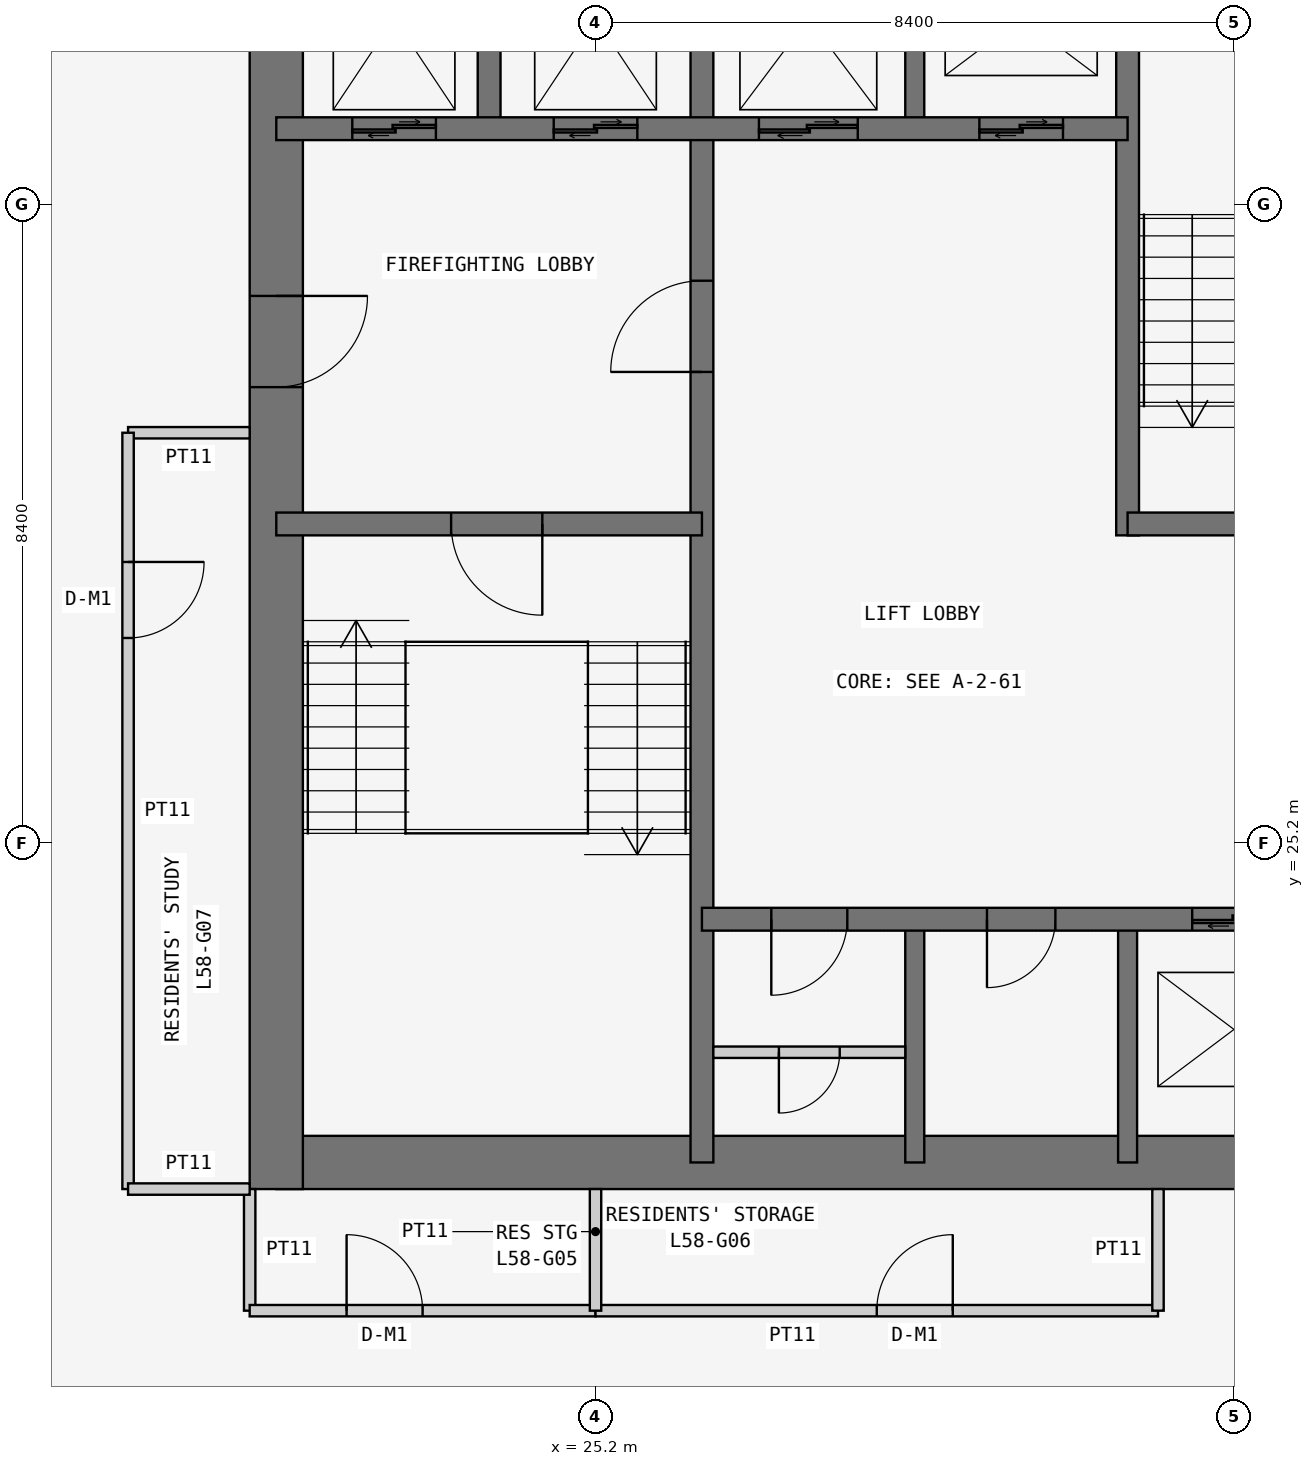
"""IFC4 building model, lengths in metres.
Left out: names, types, materials, properties, quantities, classifications, styles, units other than length and angle.
Written with IfcOpenShell. Run it as: python <this file> out.ifc"""

import sys

from ifc_helpers import new_model, si_unit, direction, frame, frame_2d, origin, place, context, subcontext, project, spatial, rectangle, extrude, element, fill, save


model = new_model("IFC4")
c1 = context("Model", 3, precision=1e-05, world=origin(), true_north=direction((0.0, 1.0)))
c2 = subcontext(c1, "Body", "Model", "MODEL_VIEW")
j1 = project(units=[si_unit("LENGTHUNIT", "METRE"), si_unit("PLANEANGLEUNIT", "RADIAN")], contexts=[c1])
p1 = place(None, origin())
s1 = spatial("IfcSite", under=j1, at=p1, CompositionType="ELEMENT")
p2 = place(p1, origin())
s2 = spatial("IfcBuilding", under=s1, at=p2, CompositionType="ELEMENT")
p3 = place(p2, frame((0.0, 0.0, 222.9)))
s3 = spatial("IfcBuildingStorey", under=s2, at=p3, CompositionType="ELEMENT", Elevation=222.9)
p4 = place(p3, frame((21.0, 21.0, 0.0), z_axis=(0.0, 0.0, 1.0), x_axis=(1.0, 0.0, 0.0)))
e1 = element("IfcWall", 1, at=p4, inside=s3, PredefinedType="SHEAR", context=c2, shape_type="SweptSolid", body=[
    extrude(rectangle(XDim=17.15, YDim=0.7, at=frame_2d((8.575, 0.0))), origin(), (0.0, 0.0, 1.0), 3.6),
])
p5 = place(p3, frame((21.0, 37.8, 0.0), z_axis=(0.0, 0.0, 1.0), x_axis=(0.0, -1.0, 0.0)))
e2 = element("IfcWall", 2, at=p5, inside=s3, PredefinedType="SHEAR", context=c2, shape_type="SweptSolid", body=[
    extrude(rectangle(XDim=17.15, YDim=0.7, at=frame_2d((8.575, 0.0))), origin(), (0.0, 0.0, 1.0), 3.6),
])
p6 = place(p5, frame((5.4, 0.0, 0.0)))
e3 = element("IfcOpeningElement", 3, at=p6, cuts=e2, PredefinedType="OPENING", context=c2, shape_type="SweptSolid", body=[
    extrude(rectangle(XDim=1.2, YDim=2.1, at=frame_2d((0.6, 1.05))), frame((0.0, 0.36, 0.0), z_axis=(0.0, -1.0, 0.0), x_axis=(1.0, 0.0, 0.0)), (0.0, 0.0, 1.0), 0.72),
])
p7 = place(p3, frame((26.6, 21.0, 0.0), z_axis=(0.0, 0.0, 1.0), x_axis=(0.0, 1.0, 0.0)))
e4 = element("IfcWall", 4, at=p7, inside=s3, PredefinedType="SHEAR", context=c2, shape_type="SweptSolid", body=[
    extrude(rectangle(XDim=16.8, YDim=0.3, at=frame_2d((8.4, 0.0))), origin(), (0.0, 0.0, 1.0), 3.6),
])
p8 = place(p7, frame((10.4, 0.0, 0.0)))
e5 = element("IfcOpeningElement", 5, at=p8, cuts=e4, PredefinedType="OPENING", context=c2, shape_type="SweptSolid", body=[
    extrude(rectangle(XDim=1.2, YDim=2.1, at=frame_2d((0.6, 1.05))), frame((0.0, 0.16, 0.0), z_axis=(0.0, -1.0, 0.0), x_axis=(1.0, 0.0, 0.0)), (0.0, 0.0, 1.0), 0.32),
])
p9 = place(p3, frame((21.0, 29.4, 0.0), z_axis=(0.0, 0.0, 1.0), x_axis=(1.0, 0.0, 0.0)))
e6 = element("IfcWall", 6, at=p9, inside=s3, PredefinedType="SHEAR", context=c2, shape_type="SweptSolid", body=[
    extrude(rectangle(XDim=5.6, YDim=0.3, at=frame_2d((2.8, 0.0))), origin(), (0.0, 0.0, 1.0), 3.6),
])
p10 = place(p9, frame((2.3, 0.0, 0.0)))
e7 = element("IfcOpeningElement", 7, at=p10, cuts=e6, PredefinedType="OPENING", context=c2, shape_type="SweptSolid", body=[
    extrude(rectangle(XDim=1.2, YDim=2.1, at=frame_2d((0.6, 1.05))), frame((0.0, 0.16, 0.0), z_axis=(0.0, -1.0, 0.0), x_axis=(1.0, 0.0, 0.0)), (0.0, 0.0, 1.0), 0.32),
])
p11 = place(p3, frame((21.0, 34.6, 0.0), z_axis=(0.0, 0.0, 1.0), x_axis=(1.0, 0.0, 0.0)))
e8 = element("IfcWall", 8, at=p11, inside=s3, PredefinedType="SHEAR", context=c2, shape_type="SweptSolid", body=[
    extrude(rectangle(XDim=11.2, YDim=0.3, at=frame_2d((5.6, 0.0))), origin(), (0.0, 0.0, 1.0), 3.6),
])
p12 = place(p11, frame((9.25, 0.0, 0.0)))
e9 = element("IfcOpeningElement", 9, at=p12, cuts=e8, PredefinedType="OPENING", context=c2, shape_type="SweptSolid", body=[
    extrude(rectangle(XDim=1.1, YDim=2.1, at=frame_2d((0.55, 1.05))), frame((0.0, 0.16, 0.0), z_axis=(0.0, -1.0, 0.0), x_axis=(1.0, 0.0, 0.0)), (0.0, 0.0, 1.0), 0.32),
])
p13 = place(p11, frame((1.0, 0.0, 0.0)))
e10 = element("IfcOpeningElement", 10, at=p13, cuts=e8, PredefinedType="OPENING", context=c2, shape_type="SweptSolid", body=[
    extrude(rectangle(XDim=1.1, YDim=2.1, at=frame_2d((0.55, 1.05))), frame((0.0, 0.16, 0.0), z_axis=(0.0, -1.0, 0.0), x_axis=(1.0, 0.0, 0.0)), (0.0, 0.0, 1.0), 0.32),
])
p14 = place(p11, frame((3.65, 0.0, 0.0)))
e11 = element("IfcOpeningElement", 11, at=p14, cuts=e8, PredefinedType="OPENING", context=c2, shape_type="SweptSolid", body=[
    extrude(rectangle(XDim=1.1, YDim=2.1, at=frame_2d((0.55, 1.05))), frame((0.0, 0.16, 0.0), z_axis=(0.0, -1.0, 0.0), x_axis=(1.0, 0.0, 0.0)), (0.0, 0.0, 1.0), 0.32),
])
p15 = place(p11, frame((6.35, 0.0, 0.0)))
e12 = element("IfcOpeningElement", 12, at=p15, cuts=e8, PredefinedType="OPENING", context=c2, shape_type="SweptSolid", body=[
    extrude(rectangle(XDim=1.3, YDim=2.1, at=frame_2d((0.65, 1.05))), frame((0.0, 0.16, 0.0), z_axis=(0.0, -1.0, 0.0), x_axis=(1.0, 0.0, 0.0)), (0.0, 0.0, 1.0), 0.32),
])
p16 = place(p3, frame((23.8, 34.6, 0.0), z_axis=(0.0, 0.0, 1.0), x_axis=(0.0, 1.0, 0.0)))
e13 = element("IfcWall", 13, at=p16, inside=s3, PredefinedType="SHEAR", context=c2, shape_type="SweptSolid", body=[
    extrude(rectangle(XDim=3.2, YDim=0.3, at=frame_2d((1.6, 0.0))), origin(), (0.0, 0.0, 1.0), 3.6),
])
p17 = place(p3, frame((26.6, 24.2, 0.0), z_axis=(0.0, 0.0, 1.0), x_axis=(1.0, 0.0, 0.0)))
e14 = element("IfcWall", 14, at=p17, inside=s3, PredefinedType="SHEAR", context=c2, shape_type="SweptSolid", body=[
    extrude(rectangle(XDim=11.2, YDim=0.3, at=frame_2d((5.6, 0.0))), origin(), (0.0, 0.0, 1.0), 3.6),
])
p18 = place(p17, frame((0.913, 0.0, 0.0)))
e15 = element("IfcOpeningElement", 15, at=p18, cuts=e14, PredefinedType="OPENING", context=c2, shape_type="SweptSolid", body=[
    extrude(rectangle(XDim=1.0, YDim=2.1, at=frame_2d((0.5, 1.05))), frame((0.0, 0.16, 0.0), z_axis=(0.0, -1.0, 0.0), x_axis=(1.0, 0.0, 0.0)), (0.0, 0.0, 1.0), 0.32),
])
p19 = place(p17, frame((3.75, 0.0, 0.0)))
e16 = element("IfcOpeningElement", 16, at=p19, cuts=e14, PredefinedType="OPENING", context=c2, shape_type="SweptSolid", body=[
    extrude(rectangle(XDim=0.9, YDim=2.1, at=frame_2d((0.45, 1.05))), frame((0.0, 0.16, 0.0), z_axis=(0.0, -1.0, 0.0), x_axis=(1.0, 0.0, 0.0)), (0.0, 0.0, 1.0), 0.32),
])
p20 = place(p17, frame((6.45, 0.0, 0.0)))
e17 = element("IfcOpeningElement", 17, at=p20, cuts=e14, PredefinedType="OPENING", context=c2, shape_type="SweptSolid", body=[
    extrude(rectangle(XDim=1.1, YDim=2.1, at=frame_2d((0.55, 1.05))), frame((0.0, 0.16, 0.0), z_axis=(0.0, -1.0, 0.0), x_axis=(1.0, 0.0, 0.0)), (0.0, 0.0, 1.0), 0.32),
])
p21 = place(p17, frame((9.1, 0.0, 0.0)))
e18 = element("IfcOpeningElement", 18, at=p21, cuts=e14, PredefinedType="OPENING", context=c2, shape_type="SweptSolid", body=[
    extrude(rectangle(XDim=1.1, YDim=2.1, at=frame_2d((0.55, 1.05))), frame((0.0, 0.16, 0.0), z_axis=(0.0, -1.0, 0.0), x_axis=(1.0, 0.0, 0.0)), (0.0, 0.0, 1.0), 0.32),
])
p22 = place(p3, frame((32.2, 29.25, 0.0), z_axis=(0.0, 0.0, 1.0), x_axis=(0.0, 1.0, 0.0)))
e19 = element("IfcWall", 19, at=p22, inside=s3, PredefinedType="SHEAR", context=c2, shape_type="SweptSolid", body=[
    extrude(rectangle(XDim=8.55, YDim=0.3, at=frame_2d((4.275, 0.0))), origin(), (0.0, 0.0, 1.0), 3.6),
])
p23 = place(p3, frame((32.2, 29.4, 0.0), z_axis=(0.0, 0.0, 1.0), x_axis=(1.0, 0.0, 0.0)))
e20 = element("IfcWall", 20, at=p23, inside=s3, PredefinedType="SHEAR", context=c2, shape_type="SweptSolid", body=[
    extrude(rectangle(XDim=5.6, YDim=0.3, at=frame_2d((2.8, 0.0))), origin(), (0.0, 0.0, 1.0), 3.6),
])
p24 = place(p23, frame((2.0, 0.0, 0.0)))
e21 = element("IfcOpeningElement", 21, at=p24, cuts=e20, PredefinedType="OPENING", context=c2, shape_type="SweptSolid", body=[
    extrude(rectangle(XDim=1.2, YDim=2.1, at=frame_2d((0.6, 1.05))), frame((0.0, 0.16, 0.0), z_axis=(0.0, -1.0, 0.0), x_axis=(1.0, 0.0, 0.0)), (0.0, 0.0, 1.0), 0.32),
])
for number, where, z_axis, x_axis in (
    (22, (29.4, 21.0, 0.0), (0.0, 0.0, 1.0), (0.0, 1.0, 0.0)),
    (23, (32.2, 21.0, 0.0), (0.0, 0.0, 1.0), (0.0, 1.0, 0.0)),
    (24, (29.4, 34.6, 0.0), (0.0, 0.0, 1.0), (0.0, 1.0, 0.0)),
):
    element("IfcWall", number, at=place(p3, frame(where, z_axis=z_axis, x_axis=x_axis)), inside=s3, PredefinedType="SHEAR", context=c2, shape_type="SweptSolid", body=[
        extrude(rectangle(XDim=3.2, YDim=0.25, at=frame_2d((1.6, 0.0))), origin(), (0.0, 0.0, 1.0), 3.6),
    ])
p25 = place(p3, frame((20.65, 20.65, 0.0), z_axis=(0.0, 0.0, 1.0), x_axis=(0.0, -1.0, 0.0)))
e25 = element("IfcWall", 25, at=p25, inside=s3, PredefinedType="PARTITIONING", context=c2, shape_type="SweptSolid", body=[
    extrude(rectangle(XDim=1.6, YDim=0.15, at=frame_2d((0.8, 0.0))), origin(), (0.0, 0.0, 1.0), 3.45),
])
p26 = place(p3, frame((20.65, 19.05, 0.0), z_axis=(0.0, 0.0, 1.0), x_axis=(1.0, 0.0, 0.0)))
e26 = element("IfcWall", 26, at=p26, inside=s3, PredefinedType="PARTITIONING", context=c2, shape_type="SweptSolid", body=[
    extrude(rectangle(XDim=4.55, YDim=0.15, at=frame_2d((2.275, 0.0))), origin(), (0.0, 0.0, 1.0), 3.45),
])
p27 = place(p26, frame((1.275, 0.0, 0.0)))
e27 = element("IfcOpeningElement", 27, at=p27, cuts=e26, PredefinedType="OPENING", context=c2, shape_type="SweptSolid", body=[
    extrude(rectangle(XDim=1.0, YDim=2.1, at=frame_2d((0.5, 1.05))), frame((0.0, 0.085, 0.0), z_axis=(0.0, -1.0, 0.0), x_axis=(1.0, 0.0, 0.0)), (0.0, 0.0, 1.0), 0.17),
])
p28 = place(p3, frame((25.2, 19.05, 0.0), z_axis=(0.0, 0.0, 1.0), x_axis=(1.0, 0.0, 0.0)))
e28 = element("IfcWall", 28, at=p28, inside=s3, PredefinedType="PARTITIONING", context=c2, shape_type="SweptSolid", body=[
    extrude(rectangle(XDim=7.4, YDim=0.15, at=frame_2d((3.7, 0.0))), origin(), (0.0, 0.0, 1.0), 3.45),
])
p29 = place(p28, frame((3.7, 0.0, 0.0)))
e29 = element("IfcOpeningElement", 29, at=p29, cuts=e28, PredefinedType="OPENING", context=c2, shape_type="SweptSolid", body=[
    extrude(rectangle(XDim=1.0, YDim=2.1, at=frame_2d((0.5, 1.05))), frame((0.0, 0.085, 0.0), z_axis=(0.0, -1.0, 0.0), x_axis=(1.0, 0.0, 0.0)), (0.0, 0.0, 1.0), 0.17),
])
for number, where, z_axis, x_axis in (
    (30, (32.6, 19.05, 0.0), (0.0, 0.0, 1.0), (0.0, 1.0, 0.0)),
    (31, (20.65, 30.6, 0.0), (0.0, 0.0, 1.0), (-1.0, 0.0, 0.0)),
):
    element("IfcWall", number, at=place(p3, frame(where, z_axis=z_axis, x_axis=x_axis)), inside=s3, PredefinedType="PARTITIONING", context=c2, shape_type="SweptSolid", body=[
        extrude(rectangle(XDim=1.6, YDim=0.15, at=frame_2d((0.8, 0.0))), origin(), (0.0, 0.0, 1.0), 3.45),
    ])
p30 = place(p3, frame((19.05, 30.6, 0.0), z_axis=(0.0, 0.0, 1.0), x_axis=(0.0, -1.0, 0.0)))
e32 = element("IfcWall", 32, at=p30, inside=s3, PredefinedType="PARTITIONING", context=c2, shape_type="SweptSolid", body=[
    extrude(rectangle(XDim=9.95, YDim=0.15, at=frame_2d((4.975, 0.0))), origin(), (0.0, 0.0, 1.0), 3.45),
])
p31 = place(p30, frame((1.7, 0.0, 0.0)))
e33 = element("IfcOpeningElement", 33, at=p31, cuts=e32, PredefinedType="OPENING", context=c2, shape_type="SweptSolid", body=[
    extrude(rectangle(XDim=1.0, YDim=2.1, at=frame_2d((0.5, 1.05))), frame((0.0, 0.085, 0.0), z_axis=(0.0, -1.0, 0.0), x_axis=(1.0, 0.0, 0.0)), (0.0, 0.0, 1.0), 0.17),
])
p32 = place(p3, frame((19.05, 20.65, 0.0), z_axis=(0.0, 0.0, 1.0), x_axis=(1.0, 0.0, 0.0)))
e34 = element("IfcWall", 34, at=p32, inside=s3, PredefinedType="PARTITIONING", context=c2, shape_type="SweptSolid", body=[
    extrude(rectangle(XDim=1.6, YDim=0.15, at=frame_2d((0.8, 0.0))), origin(), (0.0, 0.0, 1.0), 3.45),
])
p33 = place(p3, frame((25.2, 19.05, 0.0), z_axis=(0.0, 0.0, 1.0), x_axis=(0.0, 1.0, 0.0)))
e35 = element("IfcWall", 35, at=p33, inside=s3, PredefinedType="PARTITIONING", context=c2, shape_type="SweptSolid", body=[
    extrude(rectangle(XDim=1.6, YDim=0.15, at=frame_2d((0.8, 0.0))), origin(), (0.0, 0.0, 1.0), 2.767),
])
p34 = place(p3, frame((26.75, 22.45, 0.0), z_axis=(0.0, 0.0, 1.0), x_axis=(1.0, 0.0, 0.0)))
e36 = element("IfcWall", 36, at=p34, inside=s3, PredefinedType="PARTITIONING", context=c2, shape_type="SweptSolid", body=[
    extrude(rectangle(XDim=2.525, YDim=0.15, at=frame_2d((1.262, 0.0))), origin(), (0.0, 0.0, 1.0), 3.45),
])
p35 = place(p34, frame((0.863, 0.0, 0.0)))
e37 = element("IfcOpeningElement", 37, at=p35, cuts=e36, PredefinedType="OPENING", context=c2, shape_type="SweptSolid", body=[
    extrude(rectangle(XDim=0.8, YDim=2.1, at=frame_2d((0.4, 1.05))), frame((0.0, 0.085, 0.0), z_axis=(0.0, -1.0, 0.0), x_axis=(1.0, 0.0, 0.0)), (0.0, 0.0, 1.0), 0.17),
])
p36 = place(p27, origin())
e38 = element("IfcDoor", 38, at=p36, inside=s3, OperationType="SINGLE_SWING_LEFT", PredefinedType="DOOR", context=c2, shape_type="SweptSolid", body=[
    extrude(rectangle(XDim=1.0, YDim=2.1, at=frame_2d((0.5, 1.05))), frame((0.0, 0.025, 0.0), z_axis=(0.0, -1.0, 0.0), x_axis=(1.0, 0.0, 0.0)), (0.0, 0.0, 1.0), 0.05),
])
fill(e27, e38)
p37 = place(p29, origin())
e39 = element("IfcDoor", 39, at=p37, inside=s3, OperationType="SINGLE_SWING_RIGHT", PredefinedType="DOOR", context=c2, shape_type="SweptSolid", body=[
    extrude(rectangle(XDim=1.0, YDim=2.1, at=frame_2d((0.5, 1.05))), frame((0.0, 0.025, 0.0), z_axis=(0.0, -1.0, 0.0), x_axis=(1.0, 0.0, 0.0)), (0.0, 0.0, 1.0), 0.05),
])
fill(e29, e39)
p38 = place(p31, origin())
e40 = element("IfcDoor", 40, at=p38, inside=s3, OperationType="SINGLE_SWING_LEFT", PredefinedType="DOOR", context=c2, shape_type="SweptSolid", body=[
    extrude(rectangle(XDim=1.0, YDim=2.1, at=frame_2d((0.5, 1.05))), frame((0.0, 0.025, 0.0), z_axis=(0.0, -1.0, 0.0), x_axis=(1.0, 0.0, 0.0)), (0.0, 0.0, 1.0), 0.05),
])
fill(e33, e40)
p39 = place(p6, origin())
e41 = element("IfcDoor", 41, at=p39, inside=s3, OperationType="SINGLE_SWING_LEFT", PredefinedType="DOOR", context=c2, shape_type="SweptSolid", body=[
    extrude(rectangle(XDim=1.2, YDim=2.1, at=frame_2d((0.6, 1.05))), frame((0.0, 0.025, 0.0), z_axis=(0.0, -1.0, 0.0), x_axis=(1.0, 0.0, 0.0)), (0.0, 0.0, 1.0), 0.05),
])
fill(e3, e41)
p40 = place(p10, frame((1.2, 0.0, 0.0), z_axis=(0.0, 0.0, 1.0), x_axis=(-1.0, 0.0, 0.0)))
e42 = element("IfcDoor", 42, at=p40, inside=s3, OperationType="SINGLE_SWING_LEFT", PredefinedType="DOOR", context=c2, shape_type="SweptSolid", body=[
    extrude(rectangle(XDim=1.2, YDim=2.1, at=frame_2d((0.6, 1.05))), frame((0.0, 0.025, 0.0), z_axis=(0.0, -1.0, 0.0), x_axis=(1.0, 0.0, 0.0)), (0.0, 0.0, 1.0), 0.05),
])
fill(e7, e42)
p41 = place(p8, origin())
e43 = element("IfcDoor", 43, at=p41, inside=s3, OperationType="SINGLE_SWING_LEFT", PredefinedType="DOOR", context=c2, shape_type="SweptSolid", body=[
    extrude(rectangle(XDim=1.2, YDim=2.1, at=frame_2d((0.6, 1.05))), frame((0.0, 0.025, 0.0), z_axis=(0.0, -1.0, 0.0), x_axis=(1.0, 0.0, 0.0)), (0.0, 0.0, 1.0), 0.05),
])
fill(e5, e43)
p42 = place(p18, frame((1.0, 0.0, 0.0), z_axis=(0.0, 0.0, 1.0), x_axis=(-1.0, 0.0, 0.0)))
e44 = element("IfcDoor", 44, at=p42, inside=s3, OperationType="SINGLE_SWING_RIGHT", PredefinedType="DOOR", context=c2, shape_type="SweptSolid", body=[
    extrude(rectangle(XDim=1.0, YDim=2.1, at=frame_2d((0.5, 1.05))), frame((0.0, 0.025, 0.0), z_axis=(0.0, -1.0, 0.0), x_axis=(1.0, 0.0, 0.0)), (0.0, 0.0, 1.0), 0.05),
])
fill(e15, e44)
p43 = place(p35, frame((0.8, 0.0, 0.0), z_axis=(0.0, 0.0, 1.0), x_axis=(-1.0, 0.0, 0.0)))
e45 = element("IfcDoor", 45, at=p43, inside=s3, OperationType="SINGLE_SWING_RIGHT", PredefinedType="DOOR", context=c2, shape_type="SweptSolid", body=[
    extrude(rectangle(XDim=0.8, YDim=2.1, at=frame_2d((0.4, 1.05))), frame((0.0, 0.025, 0.0), z_axis=(0.0, -1.0, 0.0), x_axis=(1.0, 0.0, 0.0)), (0.0, 0.0, 1.0), 0.05),
])
fill(e37, e45)
p44 = place(p19, frame((0.9, 0.0, 0.0), z_axis=(0.0, 0.0, 1.0), x_axis=(-1.0, 0.0, 0.0)))
e46 = element("IfcDoor", 46, at=p44, inside=s3, OperationType="SINGLE_SWING_RIGHT", PredefinedType="DOOR", context=c2, shape_type="SweptSolid", body=[
    extrude(rectangle(XDim=0.9, YDim=2.1, at=frame_2d((0.45, 1.05))), frame((0.0, 0.025, 0.0), z_axis=(0.0, -1.0, 0.0), x_axis=(1.0, 0.0, 0.0)), (0.0, 0.0, 1.0), 0.05),
])
fill(e16, e46)
p45 = place(p20, origin())
e47 = element("IfcDoor", 47, at=p45, inside=s3, OperationType="DOUBLE_DOOR_SLIDING", PredefinedType="DOOR", context=c2, shape_type="SweptSolid", body=[
    extrude(rectangle(XDim=1.1, YDim=2.1, at=frame_2d((0.55, 1.05))), frame((0.0, 0.025, 0.0), z_axis=(0.0, -1.0, 0.0), x_axis=(1.0, 0.0, 0.0)), (0.0, 0.0, 1.0), 0.05),
])
fill(e17, e47)
p46 = place(p12, origin())
e48 = element("IfcDoor", 48, at=p46, inside=s3, OperationType="DOUBLE_DOOR_SLIDING", PredefinedType="DOOR", context=c2, shape_type="SweptSolid", body=[
    extrude(rectangle(XDim=1.1, YDim=2.1, at=frame_2d((0.55, 1.05))), frame((0.0, 0.025, 0.0), z_axis=(0.0, -1.0, 0.0), x_axis=(1.0, 0.0, 0.0)), (0.0, 0.0, 1.0), 0.05),
])
fill(e9, e48)
p47 = place(p13, origin())
e49 = element("IfcDoor", 49, at=p47, inside=s3, OperationType="DOUBLE_DOOR_SLIDING", PredefinedType="DOOR", context=c2, shape_type="SweptSolid", body=[
    extrude(rectangle(XDim=1.1, YDim=2.1, at=frame_2d((0.55, 1.05))), frame((0.0, 0.025, 0.0), z_axis=(0.0, -1.0, 0.0), x_axis=(1.0, 0.0, 0.0)), (0.0, 0.0, 1.0), 0.05),
])
fill(e10, e49)
p48 = place(p14, origin())
e50 = element("IfcDoor", 50, at=p48, inside=s3, OperationType="DOUBLE_DOOR_SLIDING", PredefinedType="DOOR", context=c2, shape_type="SweptSolid", body=[
    extrude(rectangle(XDim=1.1, YDim=2.1, at=frame_2d((0.55, 1.05))), frame((0.0, 0.025, 0.0), z_axis=(0.0, -1.0, 0.0), x_axis=(1.0, 0.0, 0.0)), (0.0, 0.0, 1.0), 0.05),
])
fill(e11, e50)
p49 = place(p15, origin())
e51 = element("IfcDoor", 51, at=p49, inside=s3, OperationType="DOUBLE_DOOR_SLIDING", PredefinedType="DOOR", context=c2, shape_type="SweptSolid", body=[
    extrude(rectangle(XDim=1.3, YDim=2.1, at=frame_2d((0.65, 1.05))), frame((0.0, 0.025, 0.0), z_axis=(0.0, -1.0, 0.0), x_axis=(1.0, 0.0, 0.0)), (0.0, 0.0, 1.0), 0.05),
])
fill(e12, e51)
save(model, sys.argv[1])
